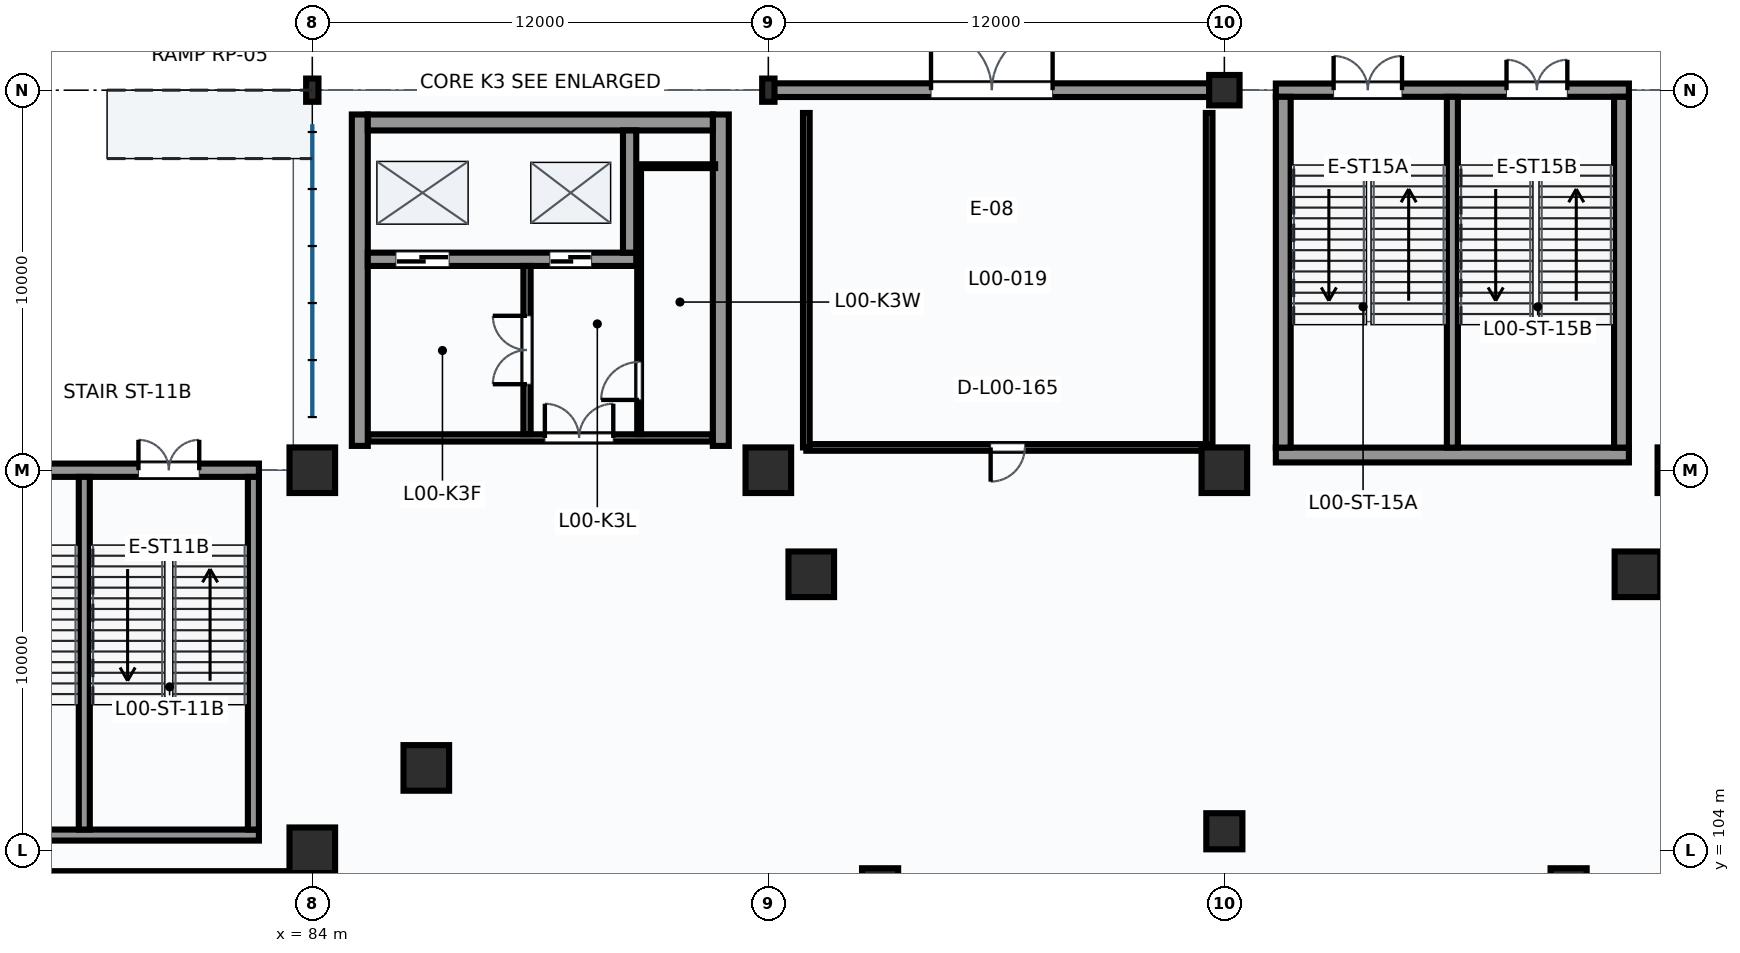
"""IFC4 building model, lengths in metres.
Left out: names, types, materials, properties, quantities, classifications, styles, units other than length and angle.
Written with IfcOpenShell. Run it as: python <this file> out.ifc"""

import sys

from ifc_helpers import new_model, si_unit, direction, frame, frame_2d, origin, origin_2d, place, context, subcontext, project, spatial, rectangle, i_section, extrude, element, fill, save


model = new_model("IFC4")
c1 = context("Model", 3, precision=1e-05, world=origin(), true_north=direction((0.0, 1.0)))
c2 = subcontext(c1, "Body", "Model", "MODEL_VIEW")
j1 = project(units=[si_unit("LENGTHUNIT", "METRE"), si_unit("PLANEANGLEUNIT", "RADIAN")], contexts=[c1])
p1 = place(None, origin())
s1 = spatial("IfcSite", under=j1, at=p1, CompositionType="ELEMENT")
p2 = place(p1, origin())
s2 = spatial("IfcBuilding", under=s1, at=p2, CompositionType="ELEMENT")
p3 = place(p2, origin())
s3 = spatial("IfcBuildingStorey", under=s2, at=p3, CompositionType="ELEMENT", Elevation=0.0)
for number, where, z_axis, x_axis in (
    (1, (84.0, 104.0, 0.0), (0.0, 0.0, 1.0), (1.0, 0.0, 0.0)),
    (2, (84.0, 114.0, 0.0), (0.0, 0.0, 1.0), (1.0, 0.0, 0.0)),
):
    element("IfcColumn", number, at=place(p3, frame(where, z_axis=z_axis, x_axis=x_axis)), inside=s3, PredefinedType="COLUMN", context=c2, shape_type="SweptSolid", body=[
        extrude(rectangle(XDim=1.2, YDim=1.2, at=origin_2d()), origin(), (0.0, 0.0, 1.0), 5.4),
    ])
p4 = place(p3, frame((84.0, 124.0, 0.0), z_axis=(0.0, 0.0, 1.0), x_axis=(1.0, 0.0, 0.0)))
e3 = element("IfcColumn", 3, at=p4, inside=s3, PredefinedType="COLUMN", context=c2, shape_type="SweptSolid", body=[
    extrude(i_section(OverallWidth=0.324, OverallDepth=0.611, WebThickness=0.013, FlangeThickness=0.019, FilletRadius=0.016, at=origin_2d()), origin(), (0.0, 0.0, 1.0), 5.4),
])
p5 = place(p3, frame((96.0, 114.0, 0.0), z_axis=(0.0, 0.0, 1.0), x_axis=(1.0, 0.0, 0.0)))
e4 = element("IfcColumn", 4, at=p5, inside=s3, PredefinedType="COLUMN", context=c2, shape_type="SweptSolid", body=[
    extrude(rectangle(XDim=1.2, YDim=1.2, at=origin_2d()), origin(), (0.0, 0.0, 1.0), 5.4),
])
p6 = place(p3, frame((96.0, 124.0, 0.0), z_axis=(0.0, 0.0, 1.0), x_axis=(1.0, 0.0, 0.0)))
e5 = element("IfcColumn", 5, at=p6, inside=s3, PredefinedType="COLUMN", context=c2, shape_type="SweptSolid", body=[
    extrude(i_section(OverallWidth=0.324, OverallDepth=0.611, WebThickness=0.013, FlangeThickness=0.019, FilletRadius=0.016, at=origin_2d()), origin(), (0.0, 0.0, 1.0), 5.4),
])
p7 = place(p3, frame((108.0, 114.0, 0.0), z_axis=(0.0, 0.0, 1.0), x_axis=(1.0, 0.0, 0.0)))
e6 = element("IfcColumn", 6, at=p7, inside=s3, PredefinedType="COLUMN", context=c2, shape_type="SweptSolid", body=[
    extrude(rectangle(XDim=1.2, YDim=1.2, at=origin_2d()), origin(), (0.0, 0.0, 1.0), 5.4),
])
p8 = place(p3, frame((108.0, 124.0, 0.0), z_axis=(0.0, 0.0, 1.0), x_axis=(1.0, 0.0, 0.0)))
e7 = element("IfcColumn", 7, at=p8, inside=s3, PredefinedType="COLUMN", context=c2, shape_type="SweptSolid", body=[
    extrude(rectangle(XDim=0.8, YDim=0.8, at=origin_2d()), origin(), (0.0, 0.0, 1.0), 5.4),
])
p9 = place(p3, frame((120.0, 114.0, 0.0), z_axis=(0.0, 0.0, 1.0), x_axis=(1.0, 0.0, 0.0)))
e8 = element("IfcColumn", 8, at=p9, inside=s3, PredefinedType="COLUMN", context=c2, shape_type="SweptSolid", body=[
    extrude(rectangle(XDim=1.2, YDim=1.2, at=origin_2d()), origin(), (0.0, 0.0, 1.0), 5.4),
])
p10 = place(p3, frame((117.059, 103.052, 0.0), z_axis=(0.0, 0.0, 1.0), x_axis=(1.0, 0.0, 0.0)))
e9 = element("IfcColumn", 9, at=p10, inside=s3, PredefinedType="COLUMN", context=c2, shape_type="SweptSolid", body=[
    extrude(rectangle(XDim=0.95, YDim=0.95, at=origin_2d()), origin(), (0.0, 0.0, 1.0), 5.4),
])
p11 = place(p3, frame((118.87, 111.262, 0.0), z_axis=(0.0, 0.0, 1.0), x_axis=(1.0, 0.0, 0.0)))
e10 = element("IfcColumn", 10, at=p11, inside=s3, PredefinedType="COLUMN", context=c2, shape_type="SweptSolid", body=[
    extrude(rectangle(XDim=1.2, YDim=1.2, at=origin_2d()), origin(), (0.0, 0.0, 1.0), 5.4),
])
for number, where, z_axis, x_axis in (
    (11, (108.0, 104.5, 0.0), (0.0, 0.0, 1.0), (1.0, 0.0, 0.0)),
    (12, (98.941, 103.052, 0.0), (0.0, 0.0, 1.0), (1.0, 0.0, 0.0)),
):
    element("IfcColumn", number, at=place(p3, frame(where, z_axis=z_axis, x_axis=x_axis)), inside=s3, PredefinedType="COLUMN", context=c2, shape_type="SweptSolid", body=[
        extrude(rectangle(XDim=0.95, YDim=0.95, at=origin_2d()), origin(), (0.0, 0.0, 1.0), 5.4),
    ])
for number, where, z_axis, x_axis in (
    (13, (97.13, 111.262, 0.0), (0.0, 0.0, 1.0), (1.0, 0.0, 0.0)),
    (14, (87.0, 106.167, 0.0), (0.0, 0.0, 1.0), (1.0, 0.0, 0.0)),
):
    element("IfcColumn", number, at=place(p3, frame(where, z_axis=z_axis, x_axis=x_axis)), inside=s3, PredefinedType="COLUMN", context=c2, shape_type="SweptSolid", body=[
        extrude(rectangle(XDim=1.2, YDim=1.2, at=origin_2d()), origin(), (0.0, 0.0, 1.0), 5.4),
    ])
p12 = place(p3, frame((96.147, 124.0, 0.0), z_axis=(0.0, 0.0, 1.0), x_axis=(1.0, 0.0, 0.0)))
e15 = element("IfcWall", 15, at=p12, inside=s3, PredefinedType="SOLIDWALL", context=c2, shape_type="SweptSolid", body=[
    extrude(rectangle(XDim=11.468, YDim=0.36, at=frame_2d((5.734, 0.0))), origin(), (0.0, 0.0, 1.0), 4.04),
])
p13 = place(p12, frame((4.134, 0.0, 0.0)))
e16 = element("IfcOpeningElement", 16, at=p13, cuts=e15, PredefinedType="OPENING", context=c2, shape_type="SweptSolid", body=[
    extrude(rectangle(XDim=3.2, YDim=2.6, at=frame_2d((1.6, 1.3))), frame((0.0, 0.19, 0.0), z_axis=(0.0, -1.0, 0.0), x_axis=(1.0, 0.0, 0.0)), (0.0, 0.0, 1.0), 0.38),
])
p14 = place(p3, frame((73.405, 104.4, 0.0), z_axis=(0.0, 0.0, 1.0), x_axis=(1.0, 0.0, 0.0)))
e17 = element("IfcWall", 17, at=p14, inside=s3, PredefinedType="SHEAR", context=c2, shape_type="SweptSolid", body=[
    extrude(rectangle(XDim=9.19, YDim=0.29, at=frame_2d((4.595, 0.0))), origin(), (0.0, 0.0, 1.0), 5.4),
])
p15 = place(p3, frame((73.405, 114.0, 0.0), z_axis=(0.0, 0.0, 1.0), x_axis=(1.0, 0.0, 0.0)))
e18 = element("IfcWall", 18, at=p15, inside=s3, PredefinedType="SHEAR", context=c2, shape_type="SweptSolid", body=[
    extrude(rectangle(XDim=9.19, YDim=0.35, at=frame_2d((4.595, 0.0))), origin(), (0.0, 0.0, 1.0), 4.574),
])
p16 = place(p15, frame((1.47, 0.0, 0.0)))
e19 = element("IfcOpeningElement", 19, at=p16, cuts=e18, PredefinedType="OPENING", context=c2, shape_type="SweptSolid", body=[
    extrude(rectangle(XDim=1.8, YDim=2.2, at=frame_2d((0.9, 1.1))), frame((0.0, 0.185, 0.0), z_axis=(0.0, -1.0, 0.0), x_axis=(1.0, 0.0, 0.0)), (0.0, 0.0, 1.0), 0.37),
])
p17 = place(p15, frame((6.02, 0.0, 0.0)))
e20 = element("IfcOpeningElement", 20, at=p17, cuts=e18, PredefinedType="OPENING", context=c2, shape_type="SweptSolid", body=[
    extrude(rectangle(XDim=1.6, YDim=2.2, at=frame_2d((0.8, 1.1))), frame((0.0, 0.185, 0.0), z_axis=(0.0, -1.0, 0.0), x_axis=(1.0, 0.0, 0.0)), (0.0, 0.0, 1.0), 0.37),
])
for number, where, z_axis, x_axis in (
    (21, (82.45, 104.545, 0.0), (0.0, 0.0, 1.0), (0.0, 1.0, 0.0)),
    (22, (78.0, 104.545, 0.0), (0.0, 0.0, 1.0), (0.0, 1.0, 0.0)),
):
    element("IfcWall", number, at=place(p3, frame(where, z_axis=z_axis, x_axis=x_axis)), inside=s3, PredefinedType="SHEAR", context=c2, shape_type="SweptSolid", body=[
        extrude(rectangle(XDim=9.28, YDim=0.29, at=frame_2d((4.64, 0.0))), origin(), (0.0, 0.0, 1.0), 5.4),
    ])
p18 = place(p3, frame((109.355, 114.4, 0.0), z_axis=(0.0, 0.0, 1.0), x_axis=(1.0, 0.0, 0.0)))
e23 = element("IfcWall", 23, at=p18, inside=s3, PredefinedType="SHEAR", context=c2, shape_type="SweptSolid", body=[
    extrude(rectangle(XDim=9.29, YDim=0.39, at=frame_2d((4.645, 0.0))), origin(), (0.0, 0.0, 1.0), 5.4),
])
p19 = place(p3, frame((109.355, 124.0, 0.0), z_axis=(0.0, 0.0, 1.0), x_axis=(1.0, 0.0, 0.0)))
e24 = element("IfcWall", 24, at=p19, inside=s3, PredefinedType="SHEAR", context=c2, shape_type="SweptSolid", body=[
    extrude(rectangle(XDim=9.29, YDim=0.35, at=frame_2d((4.645, 0.0))), origin(), (0.0, 0.0, 1.0), 4.347),
])
p20 = place(p19, frame((1.52, 0.0, 0.0)))
e25 = element("IfcOpeningElement", 25, at=p20, cuts=e24, PredefinedType="OPENING", context=c2, shape_type="SweptSolid", body=[
    extrude(rectangle(XDim=1.8, YDim=2.2, at=frame_2d((0.9, 1.1))), frame((0.0, 0.185, 0.0), z_axis=(0.0, -1.0, 0.0), x_axis=(1.0, 0.0, 0.0)), (0.0, 0.0, 1.0), 0.37),
])
p21 = place(p19, frame((6.07, 0.0, 0.0)))
e26 = element("IfcOpeningElement", 26, at=p21, cuts=e24, PredefinedType="OPENING", context=c2, shape_type="SweptSolid", body=[
    extrude(rectangle(XDim=1.6, YDim=2.2, at=frame_2d((0.8, 1.1))), frame((0.0, 0.185, 0.0), z_axis=(0.0, -1.0, 0.0), x_axis=(1.0, 0.0, 0.0)), (0.0, 0.0, 1.0), 0.37),
])
for number, where, z_axis, x_axis in (
    (27, (109.55, 114.595, 0.0), (0.0, 0.0, 1.0), (0.0, 1.0, 0.0)),
    (28, (118.45, 114.595, 0.0), (0.0, 0.0, 1.0), (0.0, 1.0, 0.0)),
):
    element("IfcWall", number, at=place(p3, frame(where, z_axis=z_axis, x_axis=x_axis)), inside=s3, PredefinedType="SHEAR", context=c2, shape_type="SweptSolid", body=[
        extrude(rectangle(XDim=9.23, YDim=0.39, at=frame_2d((4.615, 0.0))), origin(), (0.0, 0.0, 1.0), 5.4),
    ])
p22 = place(p3, frame((114.0, 114.595, 0.0), z_axis=(0.0, 0.0, 1.0), x_axis=(0.0, 1.0, 0.0)))
e29 = element("IfcWall", 29, at=p22, inside=s3, PredefinedType="SHEAR", context=c2, shape_type="SweptSolid", body=[
    extrude(rectangle(XDim=9.23, YDim=0.29, at=frame_2d((4.615, 0.0))), origin(), (0.0, 0.0, 1.0), 5.4),
])
for number, where, z_axis, x_axis in (
    (30, (85.25, 114.64, 0.0), (0.0, 0.0, 1.0), (0.0, 1.0, 0.0)),
    (31, (94.75, 114.64, 0.0), (0.0, 0.0, 1.0), (0.0, 1.0, 0.0)),
):
    element("IfcWall", number, at=place(p3, frame(where, z_axis=z_axis, x_axis=x_axis)), inside=s3, PredefinedType="SHEAR", context=c2, shape_type="SweptSolid", body=[
        extrude(rectangle(XDim=8.72, YDim=0.42, at=frame_2d((4.36, 0.0))), origin(), (0.0, 0.0, 1.0), 5.4),
    ])
p23 = place(p3, frame((85.46, 123.15, 0.0), z_axis=(0.0, 0.0, 1.0), x_axis=(1.0, 0.0, 0.0)))
e32 = element("IfcWall", 32, at=p23, inside=s3, PredefinedType="SHEAR", context=c2, shape_type="SweptSolid", body=[
    extrude(rectangle(XDim=9.08, YDim=0.42, at=frame_2d((4.54, 0.0))), origin(), (0.0, 0.0, 1.0), 5.4),
])
p24 = place(p3, frame((85.46, 119.55, 0.0), z_axis=(0.0, 0.0, 1.0), x_axis=(1.0, 0.0, 0.0)))
e33 = element("IfcWall", 33, at=p24, inside=s3, PredefinedType="SHEAR", context=c2, shape_type="SweptSolid", body=[
    extrude(rectangle(XDim=7.065, YDim=0.35, at=frame_2d((3.532, 0.0))), origin(), (0.0, 0.0, 1.0), 5.4),
])
p25 = place(p24, frame((0.74, 0.0, 0.0)))
e34 = element("IfcOpeningElement", 34, at=p25, cuts=e33, PredefinedType="OPENING", context=c2, shape_type="SweptSolid", body=[
    extrude(rectangle(XDim=1.4, YDim=2.3, at=frame_2d((0.7, 1.15))), frame((0.0, 0.185, 0.0), z_axis=(0.0, -1.0, 0.0), x_axis=(1.0, 0.0, 0.0)), (0.0, 0.0, 1.0), 0.37),
])
p26 = place(p24, frame((4.79, 0.0, 0.0)))
e35 = element("IfcOpeningElement", 35, at=p26, cuts=e33, PredefinedType="OPENING", context=c2, shape_type="SweptSolid", body=[
    extrude(rectangle(XDim=1.1, YDim=2.2, at=frame_2d((0.55, 1.1))), frame((0.0, 0.185, 0.0), z_axis=(0.0, -1.0, 0.0), x_axis=(1.0, 0.0, 0.0)), (0.0, 0.0, 1.0), 0.37),
])
p27 = place(p3, frame((92.35, 119.725, 0.0), z_axis=(0.0, 0.0, 1.0), x_axis=(0.0, 1.0, 0.0)))
e36 = element("IfcWall", 36, at=p27, inside=s3, PredefinedType="SHEAR", context=c2, shape_type="SweptSolid", body=[
    extrude(rectangle(XDim=3.215, YDim=0.35, at=frame_2d((1.607, 0.0))), origin(), (0.0, 0.0, 1.0), 5.4),
])
p28 = place(p3, frame((85.47, 114.85, 0.0), z_axis=(0.0, 0.0, 1.0), x_axis=(1.0, 0.0, 0.0)))
e37 = element("IfcWall", 37, at=p28, inside=s3, PredefinedType="PARTITIONING", context=c2, shape_type="SweptSolid", body=[
    extrude(rectangle(XDim=9.06, YDim=0.19, at=frame_2d((4.53, 0.0))), origin(), (0.0, 0.0, 1.0), 5.06),
])
p29 = place(p28, frame((4.65, 0.0, 0.0)))
e38 = element("IfcOpeningElement", 38, at=p29, cuts=e37, PredefinedType="OPENING", context=c2, shape_type="SweptSolid", body=[
    extrude(rectangle(XDim=1.8, YDim=2.3, at=frame_2d((0.9, 1.15))), frame((0.0, 0.105, 0.0), z_axis=(0.0, -1.0, 0.0), x_axis=(1.0, 0.0, 0.0)), (0.0, 0.0, 1.0), 0.21),
])
p30 = place(p3, frame((89.65, 114.95, 0.0), z_axis=(0.0, 0.0, 1.0), x_axis=(0.0, 1.0, 0.0)))
e39 = element("IfcWall", 39, at=p30, inside=s3, PredefinedType="PARTITIONING", context=c2, shape_type="SweptSolid", body=[
    extrude(rectangle(XDim=4.425, YDim=0.19, at=frame_2d((2.212, 0.0))), origin(), (0.0, 0.0, 1.0), 5.06),
])
p31 = place(p30, frame((1.313, 0.0, 0.0)))
e40 = element("IfcOpeningElement", 40, at=p31, cuts=e39, PredefinedType="OPENING", context=c2, shape_type="SweptSolid", body=[
    extrude(rectangle(XDim=1.8, YDim=2.2, at=frame_2d((0.9, 1.1))), frame((0.0, 0.105, 0.0), z_axis=(0.0, -1.0, 0.0), x_axis=(1.0, 0.0, 0.0)), (0.0, 0.0, 1.0), 0.21),
])
p32 = place(p3, frame((92.6, 114.95, 0.0), z_axis=(0.0, 0.0, 1.0), x_axis=(0.0, 1.0, 0.0)))
e41 = element("IfcWall", 41, at=p32, inside=s3, PredefinedType="PARTITIONING", context=c2, shape_type="SweptSolid", body=[
    extrude(rectangle(XDim=7.05, YDim=0.1, at=frame_2d((3.525, 0.0))), origin(), (0.0, 0.0, 1.0), 5.06),
])
p33 = place(p32, frame((0.9, 0.0, 0.0)))
e42 = element("IfcOpeningElement", 42, at=p33, cuts=e41, PredefinedType="OPENING", context=c2, shape_type="SweptSolid", body=[
    extrude(rectangle(XDim=1.0, YDim=2.1, at=frame_2d((0.5, 1.05))), frame((0.0, 0.06, 0.0), z_axis=(0.0, -1.0, 0.0), x_axis=(1.0, 0.0, 0.0)), (0.0, 0.0, 1.0), 0.12),
])
p34 = place(p3, frame((92.6, 122.0, 0.0), z_axis=(0.0, 0.0, 1.0), x_axis=(1.0, 0.0, 0.0)))
e43 = element("IfcWall", 43, at=p34, inside=s3, PredefinedType="PARTITIONING", context=c2, shape_type="SweptSolid", body=[
    extrude(rectangle(XDim=2.0, YDim=0.1, at=frame_2d((1.0, 0.0))), origin(), (0.0, 0.0, 1.0), 5.06),
])
p35 = place(p3, frame((107.6, 123.4, 0.0), z_axis=(0.0, 0.0, 1.0), x_axis=(0.0, -1.0, 0.0)))
e44 = element("IfcWall", 44, at=p35, inside=s3, PredefinedType="PARTITIONING", context=c2, shape_type="SweptSolid", body=[
    extrude(rectangle(XDim=8.8, YDim=0.175, at=frame_2d((4.4, 0.0))), origin(), (0.0, 0.0, 1.0), 4.73),
])
p36 = place(p3, frame((107.6, 114.6, 0.0), z_axis=(0.0, 0.0, 1.0), x_axis=(-1.0, 0.0, 0.0)))
e45 = element("IfcWall", 45, at=p36, inside=s3, PredefinedType="PARTITIONING", context=c2, shape_type="SweptSolid", body=[
    extrude(rectangle(XDim=10.6, YDim=0.175, at=frame_2d((5.3, 0.0))), origin(), (0.0, 0.0, 1.0), 5.06),
])
p37 = place(p36, frame((4.85, 0.0, 0.0)))
e46 = element("IfcOpeningElement", 46, at=p37, cuts=e45, PredefinedType="OPENING", context=c2, shape_type="SweptSolid", body=[
    extrude(rectangle(XDim=0.9, YDim=2.1, at=frame_2d((0.45, 1.05))), frame((0.0, 0.097, 0.0), z_axis=(0.0, -1.0, 0.0), x_axis=(1.0, 0.0, 0.0)), (0.0, 0.0, 1.0), 0.195),
])
p38 = place(p3, frame((97.0, 114.6, 0.0), z_axis=(0.0, 0.0, 1.0), x_axis=(0.0, 1.0, 0.0)))
e47 = element("IfcWall", 47, at=p38, inside=s3, PredefinedType="PARTITIONING", context=c2, shape_type="SweptSolid", body=[
    extrude(rectangle(XDim=8.8, YDim=0.175, at=frame_2d((4.4, 0.0))), origin(), (0.0, 0.0, 1.0), 4.73),
])
p39 = place(p3, frame((72.4, 103.4, 0.0), z_axis=(0.0, 0.0, 1.0), x_axis=(1.0, 0.0, 0.0)))
e48 = element("IfcWall", 48, at=p39, inside=s3, PredefinedType="PARTITIONING", context=c2, shape_type="SweptSolid", body=[
    extrude(rectangle(XDim=11.0, YDim=0.1, at=frame_2d((5.5, 0.0))), origin(), (0.0, 0.0, 1.0), 5.06),
])
p40 = place(p13, origin())
e49 = element("IfcDoor", 49, at=p40, inside=s3, OperationType="DOUBLE_DOOR_SINGLE_SWING", PredefinedType="DOOR", context=c2, shape_type="SweptSolid", body=[
    extrude(rectangle(XDim=3.2, YDim=2.6, at=frame_2d((1.6, 1.3))), frame((0.0, 0.025, 0.0), z_axis=(0.0, -1.0, 0.0), x_axis=(1.0, 0.0, 0.0)), (0.0, 0.0, 1.0), 0.05),
])
fill(e16, e49)
p41 = place(p17, origin())
e50 = element("IfcDoor", 50, at=p41, inside=s3, OperationType="DOUBLE_DOOR_SINGLE_SWING", PredefinedType="DOOR", context=c2, shape_type="SweptSolid", body=[
    extrude(rectangle(XDim=1.6, YDim=2.2, at=frame_2d((0.8, 1.1))), frame((0.0, 0.025, 0.0), z_axis=(0.0, -1.0, 0.0), x_axis=(1.0, 0.0, 0.0)), (0.0, 0.0, 1.0), 0.05),
])
fill(e20, e50)
p42 = place(p20, origin())
e51 = element("IfcDoor", 51, at=p42, inside=s3, OperationType="DOUBLE_DOOR_SINGLE_SWING", PredefinedType="DOOR", context=c2, shape_type="SweptSolid", body=[
    extrude(rectangle(XDim=1.8, YDim=2.2, at=frame_2d((0.9, 1.1))), frame((0.0, 0.025, 0.0), z_axis=(0.0, -1.0, 0.0), x_axis=(1.0, 0.0, 0.0)), (0.0, 0.0, 1.0), 0.05),
])
fill(e25, e51)
p43 = place(p21, origin())
e52 = element("IfcDoor", 52, at=p43, inside=s3, OperationType="DOUBLE_DOOR_SINGLE_SWING", PredefinedType="DOOR", context=c2, shape_type="SweptSolid", body=[
    extrude(rectangle(XDim=1.6, YDim=2.2, at=frame_2d((0.8, 1.1))), frame((0.0, 0.025, 0.0), z_axis=(0.0, -1.0, 0.0), x_axis=(1.0, 0.0, 0.0)), (0.0, 0.0, 1.0), 0.05),
])
fill(e26, e52)
p44 = place(p25, origin())
e53 = element("IfcDoor", 53, at=p44, inside=s3, OperationType="SLIDING_TO_LEFT", PredefinedType="DOOR", context=c2, shape_type="SweptSolid", body=[
    extrude(rectangle(XDim=1.4, YDim=2.3, at=frame_2d((0.7, 1.15))), frame((0.0, 0.025, 0.0), z_axis=(0.0, -1.0, 0.0), x_axis=(1.0, 0.0, 0.0)), (0.0, 0.0, 1.0), 0.05),
])
fill(e34, e53)
p45 = place(p26, origin())
e54 = element("IfcDoor", 54, at=p45, inside=s3, OperationType="SLIDING_TO_LEFT", PredefinedType="DOOR", context=c2, shape_type="SweptSolid", body=[
    extrude(rectangle(XDim=1.1, YDim=2.2, at=frame_2d((0.55, 1.1))), frame((0.0, 0.025, 0.0), z_axis=(0.0, -1.0, 0.0), x_axis=(1.0, 0.0, 0.0)), (0.0, 0.0, 1.0), 0.05),
])
fill(e35, e54)
p46 = place(p29, origin())
e55 = element("IfcDoor", 55, at=p46, inside=s3, OperationType="DOUBLE_DOOR_SINGLE_SWING", PredefinedType="DOOR", context=c2, shape_type="SweptSolid", body=[
    extrude(rectangle(XDim=1.8, YDim=2.3, at=frame_2d((0.9, 1.15))), frame((0.0, 0.025, 0.0), z_axis=(0.0, -1.0, 0.0), x_axis=(1.0, 0.0, 0.0)), (0.0, 0.0, 1.0), 0.05),
])
fill(e38, e55)
p47 = place(p31, origin())
e56 = element("IfcDoor", 56, at=p47, inside=s3, OperationType="DOUBLE_DOOR_SINGLE_SWING", PredefinedType="DOOR", context=c2, shape_type="SweptSolid", body=[
    extrude(rectangle(XDim=1.8, YDim=2.2, at=frame_2d((0.9, 1.1))), frame((0.0, 0.025, 0.0), z_axis=(0.0, -1.0, 0.0), x_axis=(1.0, 0.0, 0.0)), (0.0, 0.0, 1.0), 0.05),
])
fill(e40, e56)
p48 = place(p33, origin())
e57 = element("IfcDoor", 57, at=p48, inside=s3, OperationType="SINGLE_SWING_LEFT", PredefinedType="DOOR", context=c2, shape_type="SweptSolid", body=[
    extrude(rectangle(XDim=1.0, YDim=2.1, at=frame_2d((0.5, 1.05))), frame((0.0, 0.025, 0.0), z_axis=(0.0, -1.0, 0.0), x_axis=(1.0, 0.0, 0.0)), (0.0, 0.0, 1.0), 0.05),
])
fill(e42, e57)
p49 = place(p37, origin())
e58 = element("IfcDoor", 58, at=p49, inside=s3, OperationType="SINGLE_SWING_RIGHT", PredefinedType="DOOR", context=c2, shape_type="SweptSolid", body=[
    extrude(rectangle(XDim=0.9, YDim=2.1, at=frame_2d((0.45, 1.05))), frame((0.0, 0.025, 0.0), z_axis=(0.0, -1.0, 0.0), x_axis=(1.0, 0.0, 0.0)), (0.0, 0.0, 1.0), 0.05),
])
fill(e46, e58)
save(model, sys.argv[1])
